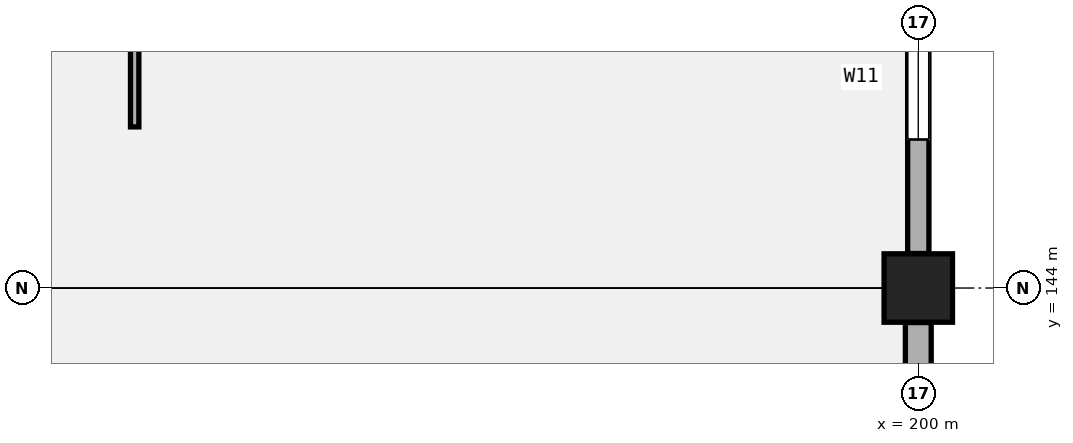
"""IFC4 building model, lengths in metres.
Left out: names, types, materials, properties, quantities, classifications, styles, units other than length and angle.
Written with IfcOpenShell. Run it as: python <this file> out.ifc"""

import sys

from ifc_helpers import new_model, si_unit, direction, frame, frame_2d, origin, origin_2d, place, context, subcontext, project, spatial, rectangle, extrude, element, fill, save


model = new_model("IFC4")
c1 = context("Model", 3, precision=1e-05, world=origin(), true_north=direction((0.0, 1.0)))
c2 = subcontext(c1, "Body", "Model", "MODEL_VIEW")
j1 = project(units=[si_unit("LENGTHUNIT", "METRE"), si_unit("PLANEANGLEUNIT", "RADIAN")], contexts=[c1])
p1 = place(None, origin())
s1 = spatial("IfcSite", under=j1, at=p1, CompositionType="ELEMENT")
p2 = place(p1, origin())
s2 = spatial("IfcBuilding", under=s1, at=p2, CompositionType="ELEMENT")
p3 = place(p2, frame((0.0, 0.0, 10.2)))
s3 = spatial("IfcBuildingStorey", under=s2, at=p3, CompositionType="ELEMENT", Elevation=10.2)
p4 = place(p3, frame((200.0, 144.0, 0.0), z_axis=(0.0, 0.0, 1.0), x_axis=(1.0, 0.0, 0.0)))
e1 = element("IfcColumn", 1, at=p4, inside=s3, PredefinedType="COLUMN", context=c2, shape_type="SweptSolid", body=[
    extrude(rectangle(XDim=0.9, YDim=0.9, at=origin_2d()), origin(), (0.0, 0.0, 1.0), 5.1),
])
p5 = place(p3, frame((200.0, 132.504, 0.0), z_axis=(0.0, 0.0, 1.0), x_axis=(0.0, 1.0, 0.0)))
e2 = element("IfcWall", 2, at=p5, inside=s3, PredefinedType="SOLIDWALL", context=c2, shape_type="SweptSolid", body=[
    extrude(rectangle(XDim=11.042, YDim=0.34, at=frame_2d((5.521, 0.0))), origin(), (0.0, 0.0, 1.0), 4.02),
])
p6 = place(p5, frame((1.5, 0.0, 0.95)))
e3 = element("IfcOpeningElement", 3, at=p6, cuts=e2, PredefinedType="OPENING", context=c2, shape_type="SweptSolid", body=[
    extrude(rectangle(XDim=1.5, YDim=2.25, at=frame_2d((0.75, 1.125))), frame((0.0, 0.18, 0.0), z_axis=(0.0, -1.0, 0.0), x_axis=(1.0, 0.0, 0.0)), (0.0, 0.0, 1.0), 0.36),
])
p7 = place(p3, frame((200.0, 144.454, 0.0), z_axis=(0.0, 0.0, 1.0), x_axis=(0.0, 1.0, 0.0)))
e4 = element("IfcWall", 4, at=p7, inside=s3, PredefinedType="SOLIDWALL", context=c2, shape_type="SweptSolid", body=[
    extrude(rectangle(XDim=11.142, YDim=0.28, at=frame_2d((5.571, 0.0))), origin(), (0.0, 0.0, 1.0), 4.12),
])
p8 = place(p7, frame((1.5, 0.0, 0.95)))
e5 = element("IfcOpeningElement", 5, at=p8, cuts=e4, PredefinedType="OPENING", context=c2, shape_type="SweptSolid", body=[
    extrude(rectangle(XDim=1.65, YDim=2.05, at=frame_2d((0.825, 1.025))), frame((0.0, 0.15, 0.0), z_axis=(0.0, -1.0, 0.0), x_axis=(1.0, 0.0, 0.0)), (0.0, 0.0, 1.0), 0.3),
])
p9 = place(p3, frame((189.69, 146.12, 0.0), z_axis=(0.0, 0.0, 1.0), x_axis=(0.0, 1.0, 0.0)))
e6 = element("IfcWall", 6, at=p9, inside=s3, PredefinedType="PARTITIONING", context=c2, shape_type="SweptSolid", body=[
    extrude(rectangle(XDim=8.03, YDim=0.11, at=frame_2d((4.015, 0.0))), origin(), (0.0, 0.0, 1.0), 4.22),
])
p10 = place(p9, frame((4.605, 0.0, 0.0), z_axis=(0.0, 0.0, 1.0), x_axis=(-1.0, 0.0, 0.0)))
e7 = element("IfcOpeningElement", 7, at=p10, cuts=e6, PredefinedType="OPENING", context=c2, shape_type="SweptSolid", body=[
    extrude(rectangle(XDim=1.18, YDim=2.2, at=frame_2d((0.59, 1.1))), frame((0.0, 0.065, 0.0), z_axis=(0.0, -1.0, 0.0), x_axis=(1.0, 0.0, 0.0)), (0.0, 0.0, 1.0), 0.13),
])
p11 = place(p8, origin())
e8 = element("IfcWindow", 8, at=p11, inside=s3, PartitioningType="SINGLE_PANEL", PredefinedType="WINDOW", context=c2, shape_type="SweptSolid", body=[
    extrude(rectangle(XDim=1.65, YDim=2.05, at=frame_2d((0.825, 1.025))), frame((0.0, 0.03, 0.0), z_axis=(0.0, -1.0, 0.0), x_axis=(1.0, 0.0, 0.0)), (0.0, 0.0, 1.0), 0.06),
])
fill(e5, e8)
save(model, sys.argv[1])
